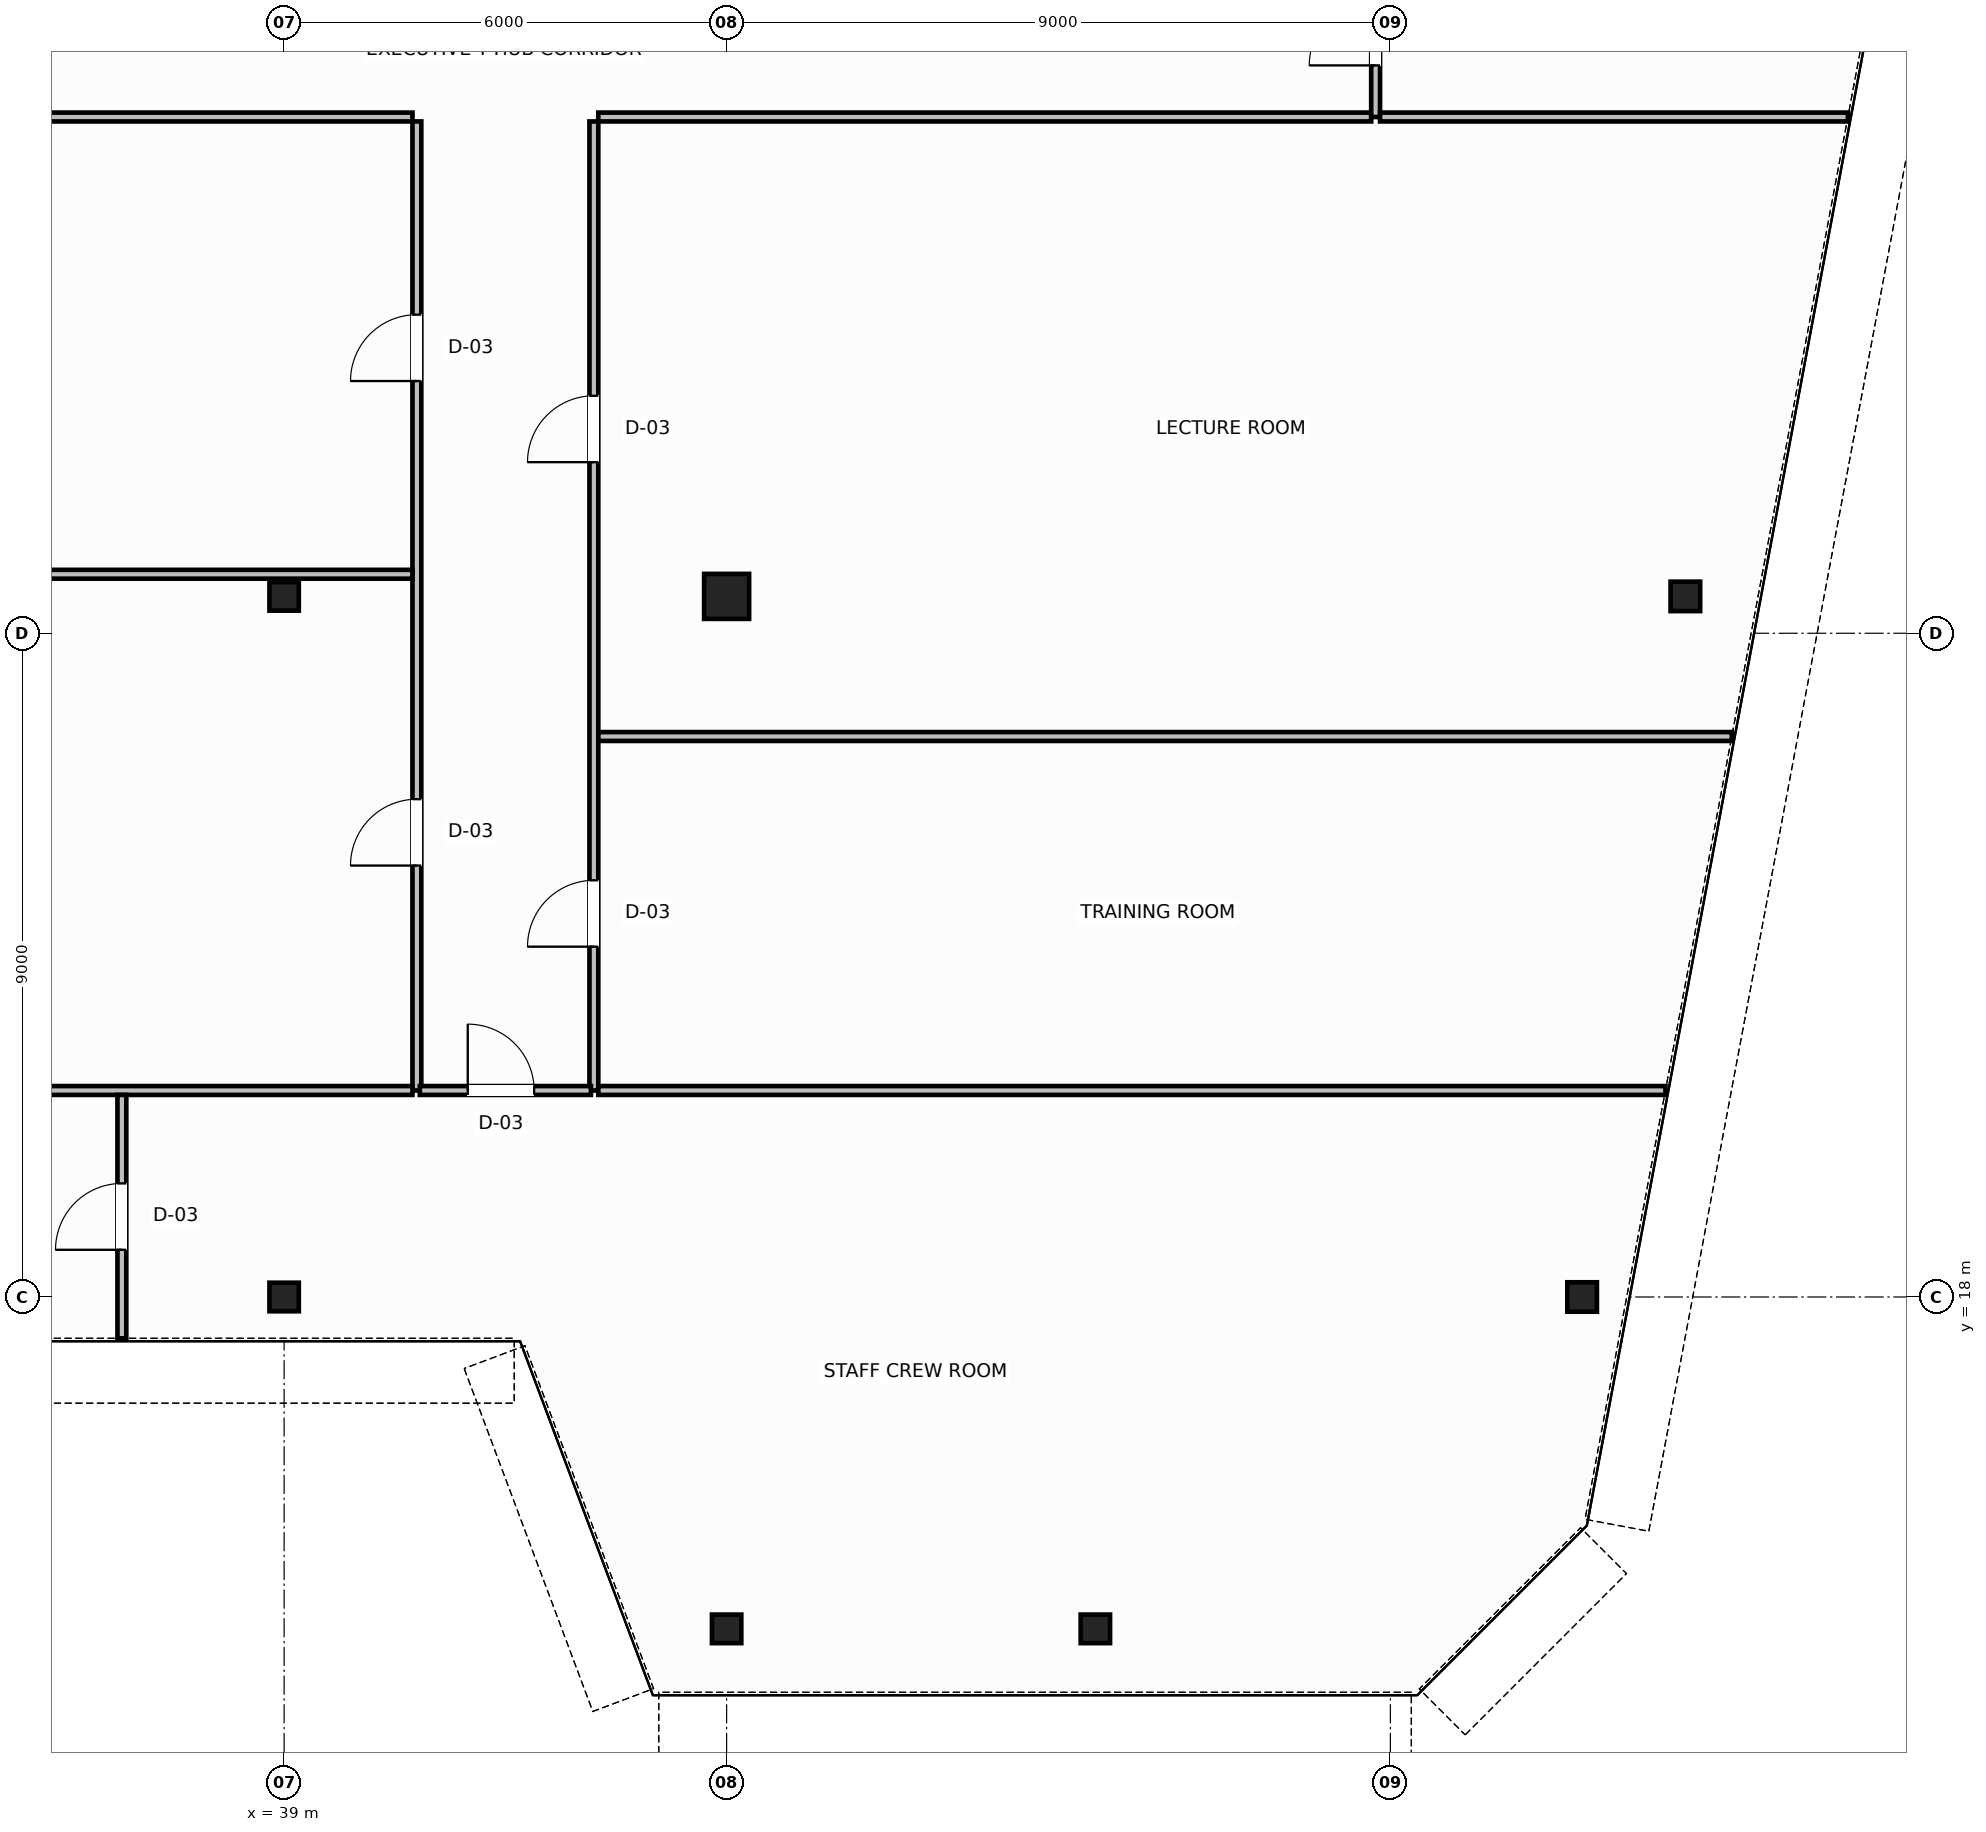
"""IFC4 building model, lengths in metres.
Left out: names, types, materials, properties, quantities, classifications, styles, units other than length and angle.
Written with IfcOpenShell. Run it as: python <this file> out.ifc"""

import sys

from ifc_helpers import new_model, si_unit, direction, frame, frame_2d, origin, origin_2d, place, context, subcontext, project, spatial, rectangle, hollow_circle, i_section, extrude, source, transform, mapped, element, fill, save


model = new_model("IFC4")
c1 = context("Model", 3, precision=1e-05, world=origin(), true_north=direction((0.0, 1.0)))
c2 = subcontext(c1, "Body", "Model", "MODEL_VIEW")
j1 = project(units=[si_unit("LENGTHUNIT", "METRE"), si_unit("PLANEANGLEUNIT", "RADIAN")], contexts=[c1])
p1 = place(None, origin())
s1 = spatial("IfcSite", under=j1, at=p1, CompositionType="ELEMENT")
p2 = place(p1, origin())
s2 = spatial("IfcBuilding", under=s1, at=p2, CompositionType="ELEMENT")
p3 = place(p2, frame((0.0, 0.0, 287.8)))
s3 = spatial("IfcBuildingStorey", under=s2, at=p3, CompositionType="ELEMENT", Elevation=287.8)
m1 = source(origin(), c2, "Body", "SweptSolid", [
    extrude(i_section(OverallWidth=0.401, OverallDepth=0.399, WebThickness=0.025, FlangeThickness=0.035, FilletRadius=0.015, at=origin_2d()), origin(), (0.0, 0.0, 1.0), 3.8),
])
for number, where, z_axis, x_axis in (
    (1, (58.0, 27.5, 0.0), (0.0, 0.0, 1.0), (1.0, 0.0, 0.0)),
    (2, (56.6, 18.0, 0.0), (0.0, 0.0, 1.0), (1.0, 0.0, 0.0)),
):
    element("IfcColumn", number, at=place(p3, frame(where, z_axis=z_axis, x_axis=x_axis)), inside=s3, PredefinedType="COLUMN", context=c2, shape_type="MappedRepresentation", body=[
        mapped(m1, transform((0.0, 0.0, 0.0), scale=1.0)),
    ])
m2 = source(origin(), c2, "Body", "SweptSolid", [
    extrude(i_section(OverallWidth=0.398, OverallDepth=0.387, WebThickness=0.021, FlangeThickness=0.029, FilletRadius=0.015, at=origin_2d()), origin(), (0.0, 0.0, 1.0), 3.8),
])
p4 = place(p3, frame((39.0, 27.5, 0.0), z_axis=(0.0, 0.0, 1.0), x_axis=(1.0, 0.0, 0.0)))
e3 = element("IfcColumn", 3, at=p4, inside=s3, PredefinedType="COLUMN", context=c2, shape_type="MappedRepresentation", body=[
    mapped(m2, transform((0.0, 0.0, 0.0), scale=1.0)),
])
m3 = source(origin(), c2, "Body", "SweptSolid", [
    extrude(hollow_circle(Radius=0.305, WallThickness=0.03, at=origin_2d()), origin(), (0.0, 0.0, 1.0), 3.8),
])
p5 = place(p3, frame((45.0, 27.5, 0.0), z_axis=(0.0, 0.0, 1.0), x_axis=(1.0, 0.0, 0.0)))
e4 = element("IfcColumn", 4, at=p5, inside=s3, PredefinedType="COLUMN", context=c2, shape_type="MappedRepresentation", body=[
    mapped(m3, transform((0.0, 0.0, 0.0), scale=1.0)),
])
for number, where, z_axis, x_axis in (
    (5, (39.0, 18.0, 0.0), (0.0, 0.0, 1.0), (1.0, 0.0, 0.0)),
    (6, (45.0, 13.5, 0.0), (0.0, 0.0, 1.0), (1.0, 0.0, 0.0)),
    (7, (50.0, 13.5, 0.0), (0.0, 0.0, 1.0), (1.0, 0.0, 0.0)),
):
    element("IfcColumn", number, at=place(p3, frame(where, z_axis=z_axis, x_axis=x_axis)), inside=s3, PredefinedType="COLUMN", context=c2, shape_type="MappedRepresentation", body=[
        mapped(m2, transform((0.0, 0.0, 0.0), scale=1.0)),
    ])
p6 = place(p3, frame((14.26, 34.0, 0.0), z_axis=(0.0, 0.0, 1.0), x_axis=(1.0, 0.0, 0.0)))
e8 = element("IfcWall", 8, at=p6, inside=s3, PredefinedType="PARTITIONING", context=c2, shape_type="SweptSolid", body=[
    extrude(rectangle(XDim=26.48, YDim=0.12, at=frame_2d((13.24, 0.0))), origin(), (0.0, 0.0, 1.0), 3.58),
])
p7 = place(p3, frame((43.26, 34.0, 0.0), z_axis=(0.0, 0.0, 1.0), x_axis=(1.0, 0.0, 0.0)))
e9 = element("IfcWall", 9, at=p7, inside=s3, PredefinedType="PARTITIONING", context=c2, shape_type="SweptSolid", body=[
    extrude(rectangle(XDim=10.48, YDim=0.12, at=frame_2d((5.24, 0.0))), origin(), (0.0, 0.0, 1.0), 3.58),
])
p8 = place(p3, frame((53.8, 34.0, 0.0), z_axis=(0.0, 0.0, 1.0), x_axis=(0.0, 1.0, 0.0)))
e10 = element("IfcWall", 10, at=p8, inside=s3, PredefinedType="PARTITIONING", context=c2, shape_type="SweptSolid", body=[
    extrude(rectangle(XDim=2.44, YDim=0.12, at=frame_2d((1.22, 0.0))), origin(), (0.0, 0.0, 1.0), 3.58),
])
p9 = place(p8, frame((0.7, 0.0, 0.0)))
e11 = element("IfcOpeningElement", 11, at=p9, cuts=e10, PredefinedType="OPENING", context=c2, shape_type="SweptSolid", body=[
    extrude(rectangle(XDim=0.9, YDim=2.15, at=frame_2d((0.45, 1.075))), frame((0.0, 0.07, 0.0), z_axis=(0.0, -1.0, 0.0), x_axis=(1.0, 0.0, 0.0)), (0.0, 0.0, 1.0), 0.14),
])
p10 = place(p3, frame((40.8, 20.8, 0.0), z_axis=(0.0, 0.0, 1.0), x_axis=(0.0, 1.0, 0.0)))
e12 = element("IfcWall", 12, at=p10, inside=s3, PredefinedType="PARTITIONING", context=c2, shape_type="SweptSolid", body=[
    extrude(rectangle(XDim=13.14, YDim=0.12, at=frame_2d((6.57, 0.0))), origin(), (0.0, 0.0, 1.0), 3.58),
])
p11 = place(p10, frame((3.05, 0.0, 0.0)))
e13 = element("IfcOpeningElement", 13, at=p11, cuts=e12, PredefinedType="OPENING", context=c2, shape_type="SweptSolid", body=[
    extrude(rectangle(XDim=0.9, YDim=2.15, at=frame_2d((0.45, 1.075))), frame((0.0, 0.07, 0.0), z_axis=(0.0, -1.0, 0.0), x_axis=(1.0, 0.0, 0.0)), (0.0, 0.0, 1.0), 0.14),
])
p12 = place(p10, frame((9.62, 0.0, 0.0)))
e14 = element("IfcOpeningElement", 14, at=p12, cuts=e12, PredefinedType="OPENING", context=c2, shape_type="SweptSolid", body=[
    extrude(rectangle(XDim=0.9, YDim=2.15, at=frame_2d((0.45, 1.075))), frame((0.0, 0.07, 0.0), z_axis=(0.0, -1.0, 0.0), x_axis=(1.0, 0.0, 0.0)), (0.0, 0.0, 1.0), 0.14),
])
p13 = place(p3, frame((43.2, 20.8, 0.0), z_axis=(0.0, 0.0, 1.0), x_axis=(0.0, 1.0, 0.0)))
e15 = element("IfcWall", 15, at=p13, inside=s3, PredefinedType="PARTITIONING", context=c2, shape_type="SweptSolid", body=[
    extrude(rectangle(XDim=13.14, YDim=0.12, at=frame_2d((6.57, 0.0))), origin(), (0.0, 0.0, 1.0), 3.58),
])
p14 = place(p13, frame((1.95, 0.0, 0.0)))
e16 = element("IfcOpeningElement", 16, at=p14, cuts=e15, PredefinedType="OPENING", context=c2, shape_type="SweptSolid", body=[
    extrude(rectangle(XDim=0.9, YDim=2.15, at=frame_2d((0.45, 1.075))), frame((0.0, 0.07, 0.0), z_axis=(0.0, -1.0, 0.0), x_axis=(1.0, 0.0, 0.0)), (0.0, 0.0, 1.0), 0.14),
])
p15 = place(p13, frame((8.52, 0.0, 0.0)))
e17 = element("IfcOpeningElement", 17, at=p15, cuts=e15, PredefinedType="OPENING", context=c2, shape_type="SweptSolid", body=[
    extrude(rectangle(XDim=0.9, YDim=2.15, at=frame_2d((0.45, 1.075))), frame((0.0, 0.07, 0.0), z_axis=(0.0, -1.0, 0.0), x_axis=(1.0, 0.0, 0.0)), (0.0, 0.0, 1.0), 0.14),
])
p16 = place(p3, frame((40.84, 20.8, 0.0), z_axis=(0.0, 0.0, 1.0), x_axis=(1.0, 0.0, 0.0)))
e18 = element("IfcWall", 18, at=p16, inside=s3, PredefinedType="PARTITIONING", context=c2, shape_type="SweptSolid", body=[
    extrude(rectangle(XDim=2.32, YDim=0.12, at=frame_2d((1.16, 0.0))), origin(), (0.0, 0.0, 1.0), 3.58),
])
p17 = place(p16, frame((0.65, 0.0, 0.0)))
e19 = element("IfcOpeningElement", 19, at=p17, cuts=e18, PredefinedType="OPENING", context=c2, shape_type="SweptSolid", body=[
    extrude(rectangle(XDim=0.9, YDim=2.15, at=frame_2d((0.45, 1.075))), frame((0.0, 0.07, 0.0), z_axis=(0.0, -1.0, 0.0), x_axis=(1.0, 0.0, 0.0)), (0.0, 0.0, 1.0), 0.14),
])
p18 = place(p3, frame((53.86, 34.0, 0.0), z_axis=(0.0, 0.0, 1.0), x_axis=(1.0, 0.0, 0.0)))
e20 = element("IfcWall", 20, at=p18, inside=s3, PredefinedType="PARTITIONING", context=c2, shape_type="SweptSolid", body=[
    extrude(rectangle(XDim=6.344, YDim=0.12, at=frame_2d((3.172, 0.0))), origin(), (0.0, 0.0, 1.0), 3.58),
])
p19 = place(p3, frame((8.958, 27.8, 0.0), z_axis=(0.0, 0.0, 1.0), x_axis=(1.0, 0.0, 0.0)))
e21 = element("IfcWall", 21, at=p19, inside=s3, PredefinedType="PARTITIONING", context=c2, shape_type="SweptSolid", body=[
    extrude(rectangle(XDim=31.782, YDim=0.12, at=frame_2d((15.891, 0.0))), origin(), (0.0, 0.0, 1.0), 3.58),
])
p20 = place(p3, frame((43.26, 25.6, 0.0), z_axis=(0.0, 0.0, 1.0), x_axis=(1.0, 0.0, 0.0)))
e22 = element("IfcWall", 22, at=p20, inside=s3, PredefinedType="PARTITIONING", context=c2, shape_type="SweptSolid", body=[
    extrude(rectangle(XDim=15.37, YDim=0.12, at=frame_2d((7.685, 0.0))), origin(), (0.0, 0.0, 1.0), 3.58),
])
p21 = place(p3, frame((10.27, 20.8, 0.0), z_axis=(0.0, 0.0, 1.0), x_axis=(1.0, 0.0, 0.0)))
e23 = element("IfcWall", 23, at=p21, inside=s3, PredefinedType="PARTITIONING", context=c2, shape_type="SweptSolid", body=[
    extrude(rectangle(XDim=30.47, YDim=0.12, at=frame_2d((15.235, 0.0))), origin(), (0.0, 0.0, 1.0), 3.58),
])
p22 = place(p3, frame((43.26, 20.8, 0.0), z_axis=(0.0, 0.0, 1.0), x_axis=(1.0, 0.0, 0.0)))
e24 = element("IfcWall", 24, at=p22, inside=s3, PredefinedType="PARTITIONING", context=c2, shape_type="SweptSolid", body=[
    extrude(rectangle(XDim=14.47, YDim=0.12, at=frame_2d((7.235, 0.0))), origin(), (0.0, 0.0, 1.0), 3.58),
])
p23 = place(p3, frame((36.8, 17.44, 0.0), z_axis=(0.0, 0.0, 1.0), x_axis=(0.0, 1.0, 0.0)))
e25 = element("IfcWall", 25, at=p23, inside=s3, PredefinedType="PARTITIONING", context=c2, shape_type="SweptSolid", body=[
    extrude(rectangle(XDim=3.3, YDim=0.12, at=frame_2d((1.65, 0.0))), origin(), (0.0, 0.0, 1.0), 3.58),
])
p24 = place(p23, frame((1.2, 0.0, 0.0)))
e26 = element("IfcOpeningElement", 26, at=p24, cuts=e25, PredefinedType="OPENING", context=c2, shape_type="SweptSolid", body=[
    extrude(rectangle(XDim=0.9, YDim=2.15, at=frame_2d((0.45, 1.075))), frame((0.0, 0.07, 0.0), z_axis=(0.0, -1.0, 0.0), x_axis=(1.0, 0.0, 0.0)), (0.0, 0.0, 1.0), 0.14),
])
m4 = source(origin(), c2, "Body", "SweptSolid", [
    extrude(rectangle(XDim=0.9, YDim=2.15, at=frame_2d((0.45, 1.075))), frame((0.0, 0.025, 0.0), z_axis=(0.0, -1.0, 0.0), x_axis=(1.0, 0.0, 0.0)), (0.0, 0.0, 1.0), 0.05),
])
p25 = place(p9, origin())
e27 = element("IfcDoor", 27, at=p25, inside=s3, OperationType="SINGLE_SWING_RIGHT", PredefinedType="DOOR", context=c2, shape_type="MappedRepresentation", body=[
    mapped(m4, transform((0.0, 0.0, 0.0), scale=1.0)),
])
fill(e11, e27)
p26 = place(p11, origin())
e28 = element("IfcDoor", 28, at=p26, inside=s3, OperationType="SINGLE_SWING_LEFT", PredefinedType="DOOR", context=c2, shape_type="MappedRepresentation", body=[
    mapped(m4, transform((0.0, 0.0, 0.0), scale=1.0)),
])
fill(e13, e28)
p27 = place(p12, origin())
e29 = element("IfcDoor", 29, at=p27, inside=s3, OperationType="SINGLE_SWING_RIGHT", PredefinedType="DOOR", context=c2, shape_type="MappedRepresentation", body=[
    mapped(m4, transform((0.0, 0.0, 0.0), scale=1.0)),
])
fill(e14, e29)
p28 = place(p14, origin())
e30 = element("IfcDoor", 30, at=p28, inside=s3, OperationType="SINGLE_SWING_RIGHT", PredefinedType="DOOR", context=c2, shape_type="MappedRepresentation", body=[
    mapped(m4, transform((0.0, 0.0, 0.0), scale=1.0)),
])
fill(e16, e30)
p29 = place(p15, origin())
e31 = element("IfcDoor", 31, at=p29, inside=s3, OperationType="SINGLE_SWING_LEFT", PredefinedType="DOOR", context=c2, shape_type="MappedRepresentation", body=[
    mapped(m4, transform((0.0, 0.0, 0.0), scale=1.0)),
])
fill(e17, e31)
p30 = place(p24, origin())
e32 = element("IfcDoor", 32, at=p30, inside=s3, OperationType="SINGLE_SWING_LEFT", PredefinedType="DOOR", context=c2, shape_type="MappedRepresentation", body=[
    mapped(m4, transform((0.0, 0.0, 0.0), scale=1.0)),
])
fill(e26, e32)
p31 = place(p17, origin())
e33 = element("IfcDoor", 33, at=p31, inside=s3, OperationType="SINGLE_SWING_LEFT", PredefinedType="DOOR", context=c2, shape_type="MappedRepresentation", body=[
    mapped(m4, transform((0.0, 0.0, 0.0), scale=1.0)),
])
fill(e19, e33)
save(model, sys.argv[1])
